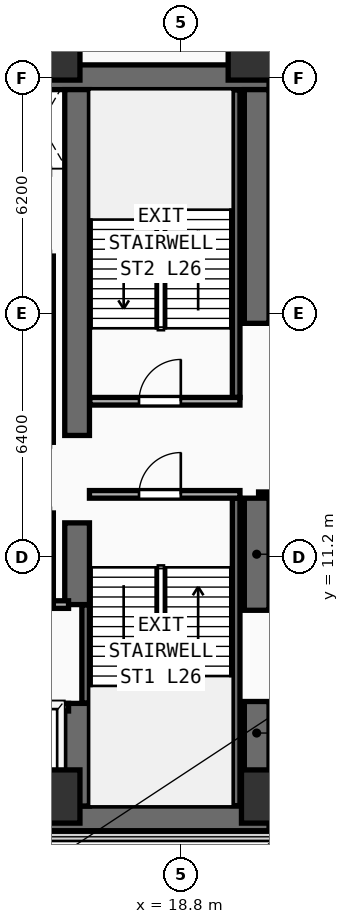
"""IFC4 building model, lengths in metres.
Left out: names, types, materials, properties, quantities, classifications, styles, units other than length and angle.
Written with IfcOpenShell. Run it as: python <this file> out.ifc"""

import sys

from ifc_helpers import new_model, si_unit, direction, frame, frame_2d, origin, origin_2d, place, context, subcontext, project, spatial, rectangle, extrude, element, fill, save


model = new_model("IFC4")
c1 = context("Model", 3, precision=1e-05, world=origin(), true_north=direction((0.0, 1.0)))
c2 = subcontext(c1, "Body", "Model", "MODEL_VIEW")
j1 = project(units=[si_unit("LENGTHUNIT", "METRE"), si_unit("PLANEANGLEUNIT", "RADIAN")], contexts=[c1])
p1 = place(None, origin())
s1 = spatial("IfcSite", under=j1, at=p1, CompositionType="ELEMENT")
p2 = place(p1, origin())
s2 = spatial("IfcBuilding", under=s1, at=p2, CompositionType="ELEMENT")
p3 = place(p2, frame((0.0, 0.0, 103.1)))
s3 = spatial("IfcBuildingStorey", under=s2, at=p3, CompositionType="ELEMENT", Elevation=103.1)
for number, where, z_axis, x_axis in (
    (1, (7.125, 4.325, 0.0), (0.0, 0.0, 1.0), (1.0, 0.0, 0.0)),
    (2, (7.125, 23.825, 0.0), (0.0, 0.0, 1.0), (1.0, 0.0, 0.0)),
):
    element("IfcWall", number, at=place(p3, frame(where, z_axis=z_axis, x_axis=x_axis)), inside=s3, PredefinedType="SHEAR", context=c2, shape_type="SweptSolid", body=[
        extrude(rectangle(XDim=14.0, YDim=0.65, at=frame_2d((7.0, 0.0))), origin(), (0.0, 0.0, 1.0), 3.54),
    ])
p4 = place(p3, frame((20.8, 4.65, 0.0), z_axis=(0.0, 0.0, 1.0), x_axis=(0.0, 1.0, 0.0)))
e3 = element("IfcWall", 3, at=p4, inside=s3, PredefinedType="SHEAR", context=c2, shape_type="SweptSolid", body=[
    extrude(rectangle(XDim=2.75, YDim=0.65, at=frame_2d((1.375, 0.0))), origin(), (0.0, 0.0, 1.0), 3.54),
])
p5 = place(p3, frame((20.8, 9.8, 0.0), z_axis=(0.0, 0.0, 1.0), x_axis=(0.0, 1.0, 0.0)))
e4 = element("IfcWall", 4, at=p5, inside=s3, PredefinedType="SHEAR", context=c2, shape_type="SweptSolid", body=[
    extrude(rectangle(XDim=2.95, YDim=0.65, at=frame_2d((1.475, 0.0))), origin(), (0.0, 0.0, 1.0), 3.54),
])
p6 = place(p3, frame((20.8, 17.35, 0.0), z_axis=(0.0, 0.0, 1.0), x_axis=(0.0, 1.0, 0.0)))
e5 = element("IfcWall", 5, at=p6, inside=s3, PredefinedType="SHEAR", context=c2, shape_type="SweptSolid", body=[
    extrude(rectangle(XDim=6.15, YDim=0.65, at=frame_2d((3.075, 0.0))), origin(), (0.0, 0.0, 1.0), 3.54),
])
p7 = place(p3, frame((16.075, 4.65, 0.0), z_axis=(0.0, 0.0, 1.0), x_axis=(0.0, 1.0, 0.0)))
e6 = element("IfcWall", 6, at=p7, inside=s3, PredefinedType="SHEAR", context=c2, shape_type="SweptSolid", body=[
    extrude(rectangle(XDim=2.7, YDim=0.65, at=frame_2d((1.35, 0.0))), origin(), (0.0, 0.0, 1.0), 3.54),
])
p8 = place(p3, frame((16.075, 9.95, 0.0), z_axis=(0.0, 0.0, 1.0), x_axis=(0.0, 1.0, 0.0)))
e7 = element("IfcWall", 7, at=p8, inside=s3, PredefinedType="SHEAR", context=c2, shape_type="SweptSolid", body=[
    extrude(rectangle(XDim=2.15, YDim=0.65, at=frame_2d((1.075, 0.0))), origin(), (0.0, 0.0, 1.0), 3.54),
])
p9 = place(p3, frame((16.075, 14.4, 0.0), z_axis=(0.0, 0.0, 1.0), x_axis=(0.0, 1.0, 0.0)))
e8 = element("IfcWall", 8, at=p9, inside=s3, PredefinedType="SHEAR", context=c2, shape_type="SweptSolid", body=[
    extrude(rectangle(XDim=9.1, YDim=0.65, at=frame_2d((4.55, 0.0))), origin(), (0.0, 0.0, 1.0), 3.54),
])
for number, where, z_axis, x_axis in (
    (9, (15.45, 4.9, 0.0), (0.0, 0.0, 1.0), (1.0, 0.0, 0.0)),
    (10, (21.1, 4.9, 0.0), (0.0, 0.0, 1.0), (1.0, 0.0, 0.0)),
    (11, (15.45, 24.45, 0.0), (0.0, 0.0, 1.0), (1.0, 0.0, 0.0)),
    (12, (20.75, 24.45, 0.0), (0.0, 0.0, 1.0), (1.0, 0.0, 0.0)),
):
    element("IfcColumn", number, at=place(p3, frame(where, z_axis=z_axis, x_axis=x_axis)), inside=s3, PredefinedType="COLUMN", context=c2, shape_type="SweptSolid", body=[
        extrude(rectangle(XDim=1.4, YDim=1.4, at=origin_2d()), origin(), (0.0, 0.0, 1.0), 3.54),
    ])
p10 = place(p3, frame((16.3, 7.36, 0.0), z_axis=(0.0, 0.0, 1.0), x_axis=(0.0, 1.0, 0.0)))
e13 = element("IfcWall", 13, at=p10, inside=s3, PredefinedType="SHEAR", context=c2, shape_type="SweptSolid", body=[
    extrude(rectangle(XDim=2.58, YDim=0.2, at=frame_2d((1.29, 0.0))), origin(), (0.0, 0.0, 1.0), 3.54),
])
p11 = place(p3, frame((20.26, 4.66, 0.0), z_axis=(0.0, 0.0, 1.0), x_axis=(0.0, 1.0, 0.0)))
e14 = element("IfcWall", 14, at=p11, inside=s3, PredefinedType="SHEAR", context=c2, shape_type="SweptSolid", body=[
    extrude(rectangle(XDim=8.09, YDim=0.2, at=frame_2d((4.045, 0.0))), origin(), (0.0, 0.0, 1.0), 3.54),
])
p12 = place(p3, frame((16.4, 12.85, 0.0), z_axis=(0.0, 0.0, 1.0), x_axis=(1.0, 0.0, 0.0)))
e15 = element("IfcWall", 15, at=p12, inside=s3, PredefinedType="PARTITIONING", context=c2, shape_type="SweptSolid", body=[
    extrude(rectangle(XDim=3.96, YDim=0.2, at=frame_2d((1.98, 0.0))), origin(), (0.0, 0.0, 1.0), 3.54),
])
p13 = place(p12, frame((1.304, 0.0, 0.0)))
e16 = element("IfcOpeningElement", 16, at=p13, cuts=e15, PredefinedType="OPENING", context=c2, shape_type="SweptSolid", body=[
    extrude(rectangle(XDim=1.1, YDim=2.2, at=frame_2d((0.55, 1.1))), frame((0.0, 0.11, 0.0), z_axis=(0.0, -1.0, 0.0), x_axis=(1.0, 0.0, 0.0)), (0.0, 0.0, 1.0), 0.22),
])
p14 = place(p3, frame((20.26, 15.4, 0.0), z_axis=(0.0, 0.0, 1.0), x_axis=(0.0, 1.0, 0.0)))
e17 = element("IfcWall", 17, at=p14, inside=s3, PredefinedType="SHEAR", context=c2, shape_type="SweptSolid", body=[
    extrude(rectangle(XDim=8.09, YDim=0.2, at=frame_2d((4.045, 0.0))), origin(), (0.0, 0.0, 1.0), 3.54),
])
p15 = place(p3, frame((16.41, 15.3, 0.0), z_axis=(0.0, 0.0, 1.0), x_axis=(1.0, 0.0, 0.0)))
e18 = element("IfcWall", 18, at=p15, inside=s3, PredefinedType="PARTITIONING", context=c2, shape_type="SweptSolid", body=[
    extrude(rectangle(XDim=3.95, YDim=0.2, at=frame_2d((1.975, 0.0))), origin(), (0.0, 0.0, 1.0), 3.54),
])
p16 = place(p15, frame((1.294, 0.0, 0.0)))
e19 = element("IfcOpeningElement", 19, at=p16, cuts=e18, PredefinedType="OPENING", context=c2, shape_type="SweptSolid", body=[
    extrude(rectangle(XDim=1.1, YDim=2.2, at=frame_2d((0.55, 1.1))), frame((0.0, 0.11, 0.0), z_axis=(0.0, -1.0, 0.0), x_axis=(1.0, 0.0, 0.0)), (0.0, 0.0, 1.0), 0.22),
])
p17 = place(p3, frame((7.5, 7.25, 0.0), z_axis=(0.0, 0.0, 1.0), x_axis=(1.0, 0.0, 0.0)))
e20 = element("IfcWall", 20, at=p17, inside=s3, PredefinedType="PARTITIONING", context=c2, shape_type="SweptSolid", body=[
    extrude(rectangle(XDim=8.35, YDim=0.2, at=frame_2d((4.175, 0.0))), origin(), (0.0, 0.0, 1.0), 3.54),
])
p18 = place(p17, frame((0.53, 0.0, 0.0)))
e21 = element("IfcOpeningElement", 21, at=p18, cuts=e20, PredefinedType="OPENING", context=c2, shape_type="SweptSolid", body=[
    extrude(rectangle(XDim=1.1, YDim=2.2, at=frame_2d((0.55, 1.1))), frame((0.0, 0.11, 0.0), z_axis=(0.0, -1.0, 0.0), x_axis=(1.0, 0.0, 0.0)), (0.0, 0.0, 1.0), 0.22),
])
p19 = place(p17, frame((2.37, 0.0, 0.0)))
e22 = element("IfcOpeningElement", 22, at=p19, cuts=e20, PredefinedType="OPENING", context=c2, shape_type="SweptSolid", body=[
    extrude(rectangle(XDim=1.1, YDim=2.2, at=frame_2d((0.55, 1.1))), frame((0.0, 0.11, 0.0), z_axis=(0.0, -1.0, 0.0), x_axis=(1.0, 0.0, 0.0)), (0.0, 0.0, 1.0), 0.22),
])
p20 = place(p17, frame((4.33, 0.0, 0.0)))
e23 = element("IfcOpeningElement", 23, at=p20, cuts=e20, PredefinedType="OPENING", context=c2, shape_type="SweptSolid", body=[
    extrude(rectangle(XDim=1.1, YDim=2.2, at=frame_2d((0.55, 1.1))), frame((0.0, 0.11, 0.0), z_axis=(0.0, -1.0, 0.0), x_axis=(1.0, 0.0, 0.0)), (0.0, 0.0, 1.0), 0.22),
])
p21 = place(p17, frame((6.5, 0.0, 0.0)))
e24 = element("IfcOpeningElement", 24, at=p21, cuts=e20, PredefinedType="OPENING", context=c2, shape_type="SweptSolid", body=[
    extrude(rectangle(XDim=1.1, YDim=2.2, at=frame_2d((0.55, 1.1))), frame((0.0, 0.11, 0.0), z_axis=(0.0, -1.0, 0.0), x_axis=(1.0, 0.0, 0.0)), (0.0, 0.0, 1.0), 0.22),
])
p22 = place(p3, frame((7.5, 9.95, 0.0), z_axis=(0.0, 0.0, 1.0), x_axis=(1.0, 0.0, 0.0)))
e25 = element("IfcWall", 25, at=p22, inside=s3, PredefinedType="PARTITIONING", context=c2, shape_type="SweptSolid", body=[
    extrude(rectangle(XDim=8.35, YDim=0.2, at=frame_2d((4.175, 0.0))), origin(), (0.0, 0.0, 1.0), 3.54),
])
p23 = place(p3, frame((15.35, 9.95, 0.0), z_axis=(0.0, 0.0, 1.0), x_axis=(0.0, 1.0, 0.0)))
e26 = element("IfcWall", 26, at=p23, inside=s3, PredefinedType="PARTITIONING", context=c2, shape_type="SweptSolid", body=[
    extrude(rectangle(XDim=2.41, YDim=0.2, at=frame_2d((1.205, 0.0))), origin(), (0.0, 0.0, 1.0), 3.54),
])
p24 = place(p3, frame((15.35, 14.22, 0.0), z_axis=(0.0, 0.0, 1.0), x_axis=(0.0, 1.0, 0.0)))
e27 = element("IfcWall", 27, at=p24, inside=s3, PredefinedType="PARTITIONING", context=c2, shape_type="SweptSolid", body=[
    extrude(rectangle(XDim=2.23, YDim=0.2, at=frame_2d((1.115, 0.0))), origin(), (0.0, 0.0, 1.0), 3.54),
])
p25 = place(p3, frame((15.35, 16.45, 0.0), z_axis=(0.0, 0.0, 1.0), x_axis=(0.0, 1.0, 0.0)))
e28 = element("IfcWall", 28, at=p25, inside=s3, PredefinedType="PARTITIONING", context=c2, shape_type="SweptSolid", body=[
    extrude(rectangle(XDim=2.67, YDim=0.2, at=frame_2d((1.335, 0.0))), origin(), (0.0, 0.0, 1.0), 3.54),
])
p26 = place(p3, frame((20.85, 12.85, 0.0), z_axis=(0.0, 0.0, 1.0), x_axis=(1.0, 0.0, 0.0)))
e29 = element("IfcWall", 29, at=p26, inside=s3, PredefinedType="PARTITIONING", context=c2, shape_type="SweptSolid", body=[
    extrude(rectangle(XDim=7.05, YDim=0.125, at=frame_2d((3.525, 0.0))), origin(), (0.0, 0.0, 1.0), 3.54),
])
p27 = place(p26, frame((2.8, 0.0, 0.0)))
e30 = element("IfcOpeningElement", 30, at=p27, cuts=e29, PredefinedType="OPENING", context=c2, shape_type="SweptSolid", body=[
    extrude(rectangle(XDim=0.95, YDim=2.15, at=frame_2d((0.475, 1.075))), frame((0.0, 0.073, 0.0), z_axis=(0.0, -1.0, 0.0), x_axis=(1.0, 0.0, 0.0)), (0.0, 0.0, 1.0), 0.145),
])
p28 = place(p13, frame((1.1, 0.0, 0.0), z_axis=(0.0, 0.0, 1.0), x_axis=(-1.0, 0.0, 0.0)))
e31 = element("IfcDoor", 31, at=p28, inside=s3, OperationType="SINGLE_SWING_LEFT", PredefinedType="DOOR", context=c2, shape_type="SweptSolid", body=[
    extrude(rectangle(XDim=1.1, YDim=2.2, at=frame_2d((0.55, 1.1))), frame((0.0, 0.025, 0.0), z_axis=(0.0, -1.0, 0.0), x_axis=(1.0, 0.0, 0.0)), (0.0, 0.0, 1.0), 0.05),
])
fill(e16, e31)
p29 = place(p16, origin())
e32 = element("IfcDoor", 32, at=p29, inside=s3, OperationType="SINGLE_SWING_RIGHT", PredefinedType="DOOR", context=c2, shape_type="SweptSolid", body=[
    extrude(rectangle(XDim=1.1, YDim=2.2, at=frame_2d((0.55, 1.1))), frame((0.0, 0.025, 0.0), z_axis=(0.0, -1.0, 0.0), x_axis=(1.0, 0.0, 0.0)), (0.0, 0.0, 1.0), 0.05),
])
fill(e19, e32)
save(model, sys.argv[1])
